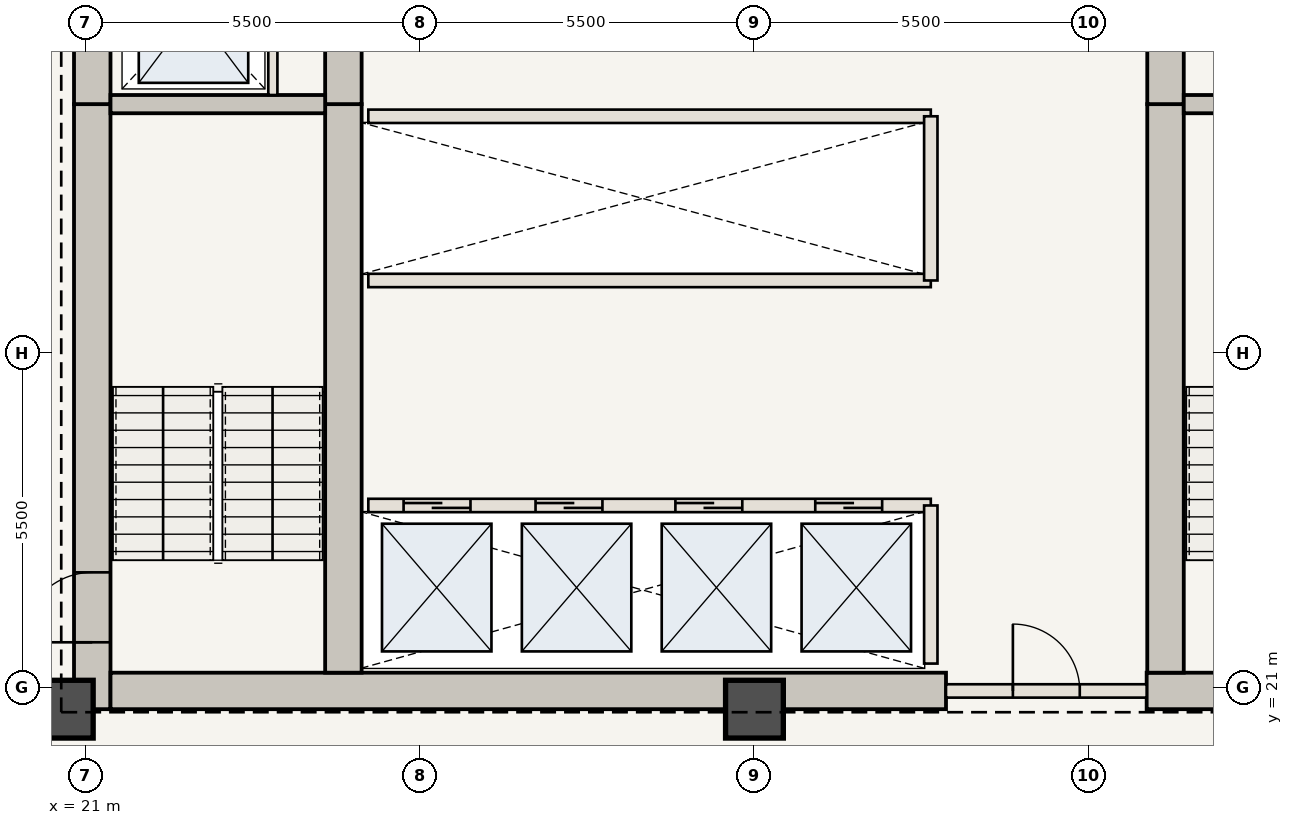
"""IFC4 building model, lengths in metres.
Left out: names, types, materials, properties, quantities, classifications, styles, units other than length and angle.
Written with IfcOpenShell. Run it as: python <this file> out.ifc"""

import sys

from ifc_helpers import new_model, si_unit, direction, frame, frame_2d, origin, origin_2d, place, context, subcontext, project, spatial, rectangle, extrude, element, fill, save


model = new_model("IFC4")
c1 = context("Model", 3, precision=1e-05, world=origin(), true_north=direction((0.0, 1.0)))
c2 = subcontext(c1, "Body", "Model", "MODEL_VIEW")
j1 = project(units=[si_unit("LENGTHUNIT", "METRE"), si_unit("PLANEANGLEUNIT", "RADIAN")], contexts=[c1])
p1 = place(None, origin())
s1 = spatial("IfcSite", under=j1, at=p1, CompositionType="ELEMENT")
p2 = place(p1, origin())
s2 = spatial("IfcBuilding", under=s1, at=p2, CompositionType="ELEMENT")
p3 = place(p2, frame((0.0, 0.0, 118.3)))
s3 = spatial("IfcBuildingStorey", under=s2, at=p3, CompositionType="ELEMENT", Elevation=118.3)
p4 = place(p3, frame((21.11, 20.65, 0.0), z_axis=(0.0, 0.0, 1.0), x_axis=(0.0, 1.0, 0.0)))
e1 = element("IfcWall", 1, at=p4, inside=s3, PredefinedType="SHEAR", context=c2, shape_type="SweptSolid", body=[
    extrude(rectangle(XDim=9.95, YDim=0.6, at=frame_2d((4.975, 0.0))), origin(), (0.0, 0.0, 1.0), 3.85),
])
p5 = place(p4, frame((1.1, 0.0, 0.0)))
e2 = element("IfcOpeningElement", 2, at=p5, cuts=e1, PredefinedType="OPENING", context=c2, shape_type="SweptSolid", body=[
    extrude(rectangle(XDim=1.15, YDim=2.15, at=frame_2d((0.575, 1.075))), frame((0.0, 0.31, 0.0), z_axis=(0.0, -1.0, 0.0), x_axis=(1.0, 0.0, 0.0)), (0.0, 0.0, 1.0), 0.62),
])
p6 = place(p3, frame((21.11, 30.6, 0.0), z_axis=(0.0, 0.0, 1.0), x_axis=(0.0, 1.0, 0.0)))
e3 = element("IfcWall", 3, at=p6, inside=s3, PredefinedType="SHEAR", context=c2, shape_type="SweptSolid", body=[
    extrude(rectangle(XDim=12.7, YDim=0.6, at=frame_2d((6.35, 0.0))), origin(), (0.0, 0.0, 1.0), 3.85),
])
p7 = place(p6, frame((4.2, 0.0, 0.0)))
e4 = element("IfcOpeningElement", 4, at=p7, cuts=e3, PredefinedType="OPENING", context=c2, shape_type="SweptSolid", body=[
    extrude(rectangle(XDim=1.1, YDim=2.15, at=frame_2d((0.55, 1.075))), frame((0.0, 0.31, 0.0), z_axis=(0.0, -1.0, 0.0), x_axis=(1.0, 0.0, 0.0)), (0.0, 0.0, 1.0), 0.62),
])
p8 = place(p6, frame((8.05, 0.0, 0.0)))
e5 = element("IfcOpeningElement", 5, at=p8, cuts=e3, PredefinedType="OPENING", context=c2, shape_type="SweptSolid", body=[
    extrude(rectangle(XDim=0.92, YDim=2.1, at=frame_2d((0.46, 1.05))), frame((0.0, 0.31, 0.0), z_axis=(0.0, -1.0, 0.0), x_axis=(1.0, 0.0, 0.0)), (0.0, 0.0, 1.0), 0.62),
])
p9 = place(p6, frame((9.45, 0.0, 0.0)))
e6 = element("IfcOpeningElement", 6, at=p9, cuts=e3, PredefinedType="OPENING", context=c2, shape_type="SweptSolid", body=[
    extrude(rectangle(XDim=0.88, YDim=2.1, at=frame_2d((0.44, 1.05))), frame((0.0, 0.31, 0.0), z_axis=(0.0, -1.0, 0.0), x_axis=(1.0, 0.0, 0.0)), (0.0, 0.0, 1.0), 0.62),
])
p10 = place(p6, frame((10.85, 0.0, 0.0)))
e7 = element("IfcOpeningElement", 7, at=p10, cuts=e3, PredefinedType="OPENING", context=c2, shape_type="SweptSolid", body=[
    extrude(rectangle(XDim=0.88, YDim=2.1, at=frame_2d((0.44, 1.05))), frame((0.0, 0.31, 0.0), z_axis=(0.0, -1.0, 0.0), x_axis=(1.0, 0.0, 0.0)), (0.0, 0.0, 1.0), 0.62),
])
p11 = place(p3, frame((21.41, 20.95, 0.0), z_axis=(0.0, 0.0, 1.0), x_axis=(1.0, 0.0, 0.0)))
e8 = element("IfcWall", 8, at=p11, inside=s3, PredefinedType="SHEAR", context=c2, shape_type="SweptSolid", body=[
    extrude(rectangle(XDim=13.74, YDim=0.6, at=frame_2d((6.87, 0.0))), origin(), (0.0, 0.0, 1.0), 3.85),
])
p12 = place(p3, frame((38.45, 20.95, 0.0), z_axis=(0.0, 0.0, 1.0), x_axis=(1.0, 0.0, 0.0)))
e9 = element("IfcWall", 9, at=p12, inside=s3, PredefinedType="SHEAR", context=c2, shape_type="SweptSolid", body=[
    extrude(rectangle(XDim=4.14, YDim=0.6, at=frame_2d((2.07, 0.0))), origin(), (0.0, 0.0, 1.0), 3.85),
])
p13 = place(p3, frame((25.24, 21.25, 0.0), z_axis=(0.0, 0.0, 1.0), x_axis=(0.0, 1.0, 0.0)))
e10 = element("IfcWall", 10, at=p13, inside=s3, PredefinedType="SHEAR", context=c2, shape_type="SweptSolid", body=[
    extrude(rectangle(XDim=9.35, YDim=0.6, at=frame_2d((4.675, 0.0))), origin(), (0.0, 0.0, 1.0), 3.85),
])
p14 = place(p3, frame((25.24, 30.6, 0.0), z_axis=(0.0, 0.0, 1.0), x_axis=(0.0, 1.0, 0.0)))
e11 = element("IfcWall", 11, at=p14, inside=s3, PredefinedType="SHEAR", context=c2, shape_type="SweptSolid", body=[
    extrude(rectangle(XDim=12.1, YDim=0.6, at=frame_2d((6.05, 0.0))), origin(), (0.0, 0.0, 1.0), 3.85),
])
p15 = place(p14, frame((6.25, 0.0, 0.0)))
e12 = element("IfcOpeningElement", 12, at=p15, cuts=e11, PredefinedType="OPENING", context=c2, shape_type="SweptSolid", body=[
    extrude(rectangle(XDim=1.1, YDim=2.15, at=frame_2d((0.55, 1.075))), frame((0.0, 0.31, 0.0), z_axis=(0.0, -1.0, 0.0), x_axis=(1.0, 0.0, 0.0)), (0.0, 0.0, 1.0), 0.62),
])
p16 = place(p3, frame((38.76, 21.25, 0.0), z_axis=(0.0, 0.0, 1.0), x_axis=(0.0, 1.0, 0.0)))
e13 = element("IfcWall", 13, at=p16, inside=s3, PredefinedType="SHEAR", context=c2, shape_type="SweptSolid", body=[
    extrude(rectangle(XDim=9.35, YDim=0.6, at=frame_2d((4.675, 0.0))), origin(), (0.0, 0.0, 1.0), 3.85),
])
p17 = place(p3, frame((38.76, 30.6, 0.0), z_axis=(0.0, 0.0, 1.0), x_axis=(0.0, 1.0, 0.0)))
e14 = element("IfcWall", 14, at=p17, inside=s3, PredefinedType="SHEAR", context=c2, shape_type="SweptSolid", body=[
    extrude(rectangle(XDim=12.1, YDim=0.6, at=frame_2d((6.05, 0.0))), origin(), (0.0, 0.0, 1.0), 3.85),
])
for number, where, z_axis, x_axis in (
    (15, (20.65, 20.65, 0.0), (0.0, 0.0, 1.0), (1.0, 0.0, 0.0)),
    (16, (32.0, 20.65, 0.0), (0.0, 0.0, 1.0), (1.0, 0.0, 0.0)),
):
    element("IfcColumn", number, at=place(p3, frame(where, z_axis=z_axis, x_axis=x_axis)), inside=s3, PredefinedType="COLUMN", context=c2, shape_type="SweptSolid", body=[
        extrude(rectangle(XDim=0.95, YDim=0.95, at=origin_2d()), origin(), (0.0, 0.0, 1.0), 3.85),
    ])
for number, where, z_axis, x_axis in (
    (17, (21.41, 30.6, 0.0), (0.0, 0.0, 1.0), (1.0, 0.0, 0.0)),
    (18, (39.06, 30.6, 0.0), (0.0, 0.0, 1.0), (1.0, 0.0, 0.0)),
):
    element("IfcWall", number, at=place(p3, frame(where, z_axis=z_axis, x_axis=x_axis)), inside=s3, PredefinedType="SHEAR", context=c2, shape_type="SweptSolid", body=[
        extrude(rectangle(XDim=3.53, YDim=0.3, at=frame_2d((1.765, 0.0))), origin(), (0.0, 0.0, 1.0), 3.685),
    ])
p18 = place(p3, frame((24.08, 30.75, 0.0), z_axis=(0.0, 0.0, 1.0), x_axis=(0.0, 1.0, 0.0)))
e19 = element("IfcWall", 19, at=p18, inside=s3, PredefinedType="STANDARD", context=c2, shape_type="SweptSolid", body=[
    extrude(rectangle(XDim=2.65, YDim=0.15, at=frame_2d((1.325, 0.0))), origin(), (0.0, 0.0, 1.0), 3.685),
])
p19 = place(p3, frame((35.15, 20.95, 0.0), z_axis=(0.0, 0.0, 1.0), x_axis=(1.0, 0.0, 0.0)))
e20 = element("IfcWall", 20, at=p19, inside=s3, PredefinedType="STANDARD", context=c2, shape_type="SweptSolid", body=[
    extrude(rectangle(XDim=3.3, YDim=0.22, at=frame_2d((1.65, 0.0))), origin(), (0.0, 0.0, 1.0), 3.685),
])
p20 = place(p19, frame((1.1, 0.0, 0.0)))
e21 = element("IfcOpeningElement", 21, at=p20, cuts=e20, PredefinedType="OPENING", context=c2, shape_type="SweptSolid", body=[
    extrude(rectangle(XDim=1.1, YDim=2.15, at=frame_2d((0.55, 1.075))), frame((0.0, 0.12, 0.0), z_axis=(0.0, -1.0, 0.0), x_axis=(1.0, 0.0, 0.0)), (0.0, 0.0, 1.0), 0.24),
])
p21 = place(p3, frame((25.65, 24.0, 0.0), z_axis=(0.0, 0.0, 1.0), x_axis=(1.0, 0.0, 0.0)))
e22 = element("IfcWall", 22, at=p21, inside=s3, PredefinedType="STANDARD", context=c2, shape_type="SweptSolid", body=[
    extrude(rectangle(XDim=9.25, YDim=0.22, at=frame_2d((4.625, 0.0))), origin(), (0.0, 0.0, 1.0), 3.685),
])
p22 = place(p21, frame((0.58, 0.0, 0.0)))
e23 = element("IfcOpeningElement", 23, at=p22, cuts=e22, PredefinedType="OPENING", context=c2, shape_type="SweptSolid", body=[
    extrude(rectangle(XDim=1.1, YDim=2.15, at=frame_2d((0.55, 1.075))), frame((0.0, 0.12, 0.0), z_axis=(0.0, -1.0, 0.0), x_axis=(1.0, 0.0, 0.0)), (0.0, 0.0, 1.0), 0.24),
])
p23 = place(p21, frame((2.75, 0.0, 0.0)))
e24 = element("IfcOpeningElement", 24, at=p23, cuts=e22, PredefinedType="OPENING", context=c2, shape_type="SweptSolid", body=[
    extrude(rectangle(XDim=1.1, YDim=2.15, at=frame_2d((0.55, 1.075))), frame((0.0, 0.12, 0.0), z_axis=(0.0, -1.0, 0.0), x_axis=(1.0, 0.0, 0.0)), (0.0, 0.0, 1.0), 0.24),
])
p24 = place(p21, frame((5.05, 0.0, 0.0)))
e25 = element("IfcOpeningElement", 25, at=p24, cuts=e22, PredefinedType="OPENING", context=c2, shape_type="SweptSolid", body=[
    extrude(rectangle(XDim=1.1, YDim=2.15, at=frame_2d((0.55, 1.075))), frame((0.0, 0.12, 0.0), z_axis=(0.0, -1.0, 0.0), x_axis=(1.0, 0.0, 0.0)), (0.0, 0.0, 1.0), 0.24),
])
p25 = place(p21, frame((7.35, 0.0, 0.0)))
e26 = element("IfcOpeningElement", 26, at=p25, cuts=e22, PredefinedType="OPENING", context=c2, shape_type="SweptSolid", body=[
    extrude(rectangle(XDim=1.1, YDim=2.15, at=frame_2d((0.55, 1.075))), frame((0.0, 0.12, 0.0), z_axis=(0.0, -1.0, 0.0), x_axis=(1.0, 0.0, 0.0)), (0.0, 0.0, 1.0), 0.24),
])
p26 = place(p3, frame((34.9, 21.4, 0.0), z_axis=(0.0, 0.0, 1.0), x_axis=(0.0, 1.0, 0.0)))
e27 = element("IfcWall", 27, at=p26, inside=s3, PredefinedType="STANDARD", context=c2, shape_type="SweptSolid", body=[
    extrude(rectangle(XDim=2.6, YDim=0.22, at=frame_2d((1.3, 0.0))), origin(), (0.0, 0.0, 1.0), 3.685),
])
for number, where, z_axis, x_axis in (
    (28, (25.65, 27.7, 0.0), (0.0, 0.0, 1.0), (1.0, 0.0, 0.0)),
    (29, (25.65, 30.4, 0.0), (0.0, 0.0, 1.0), (1.0, 0.0, 0.0)),
):
    element("IfcWall", number, at=place(p3, frame(where, z_axis=z_axis, x_axis=x_axis)), inside=s3, PredefinedType="STANDARD", context=c2, shape_type="SweptSolid", body=[
        extrude(rectangle(XDim=9.25, YDim=0.22, at=frame_2d((4.625, 0.0))), origin(), (0.0, 0.0, 1.0), 3.685),
    ])
p27 = place(p3, frame((34.9, 27.7, 0.0), z_axis=(0.0, 0.0, 1.0), x_axis=(0.0, 1.0, 0.0)))
e30 = element("IfcWall", 30, at=p27, inside=s3, PredefinedType="STANDARD", context=c2, shape_type="SweptSolid", body=[
    extrude(rectangle(XDim=2.7, YDim=0.22, at=frame_2d((1.35, 0.0))), origin(), (0.0, 0.0, 1.0), 3.685),
])
p28 = place(p5, origin())
e31 = element("IfcDoor", 31, at=p28, inside=s3, OperationType="SINGLE_SWING_LEFT", PredefinedType="DOOR", context=c2, shape_type="SweptSolid", body=[
    extrude(rectangle(XDim=1.15, YDim=2.15, at=frame_2d((0.575, 1.075))), frame((0.0, 0.025, 0.0), z_axis=(0.0, -1.0, 0.0), x_axis=(1.0, 0.0, 0.0)), (0.0, 0.0, 1.0), 0.05),
])
fill(e2, e31)
p29 = place(p20, origin())
e32 = element("IfcDoor", 32, at=p29, inside=s3, OperationType="SINGLE_SWING_LEFT", PredefinedType="DOOR", context=c2, shape_type="SweptSolid", body=[
    extrude(rectangle(XDim=1.1, YDim=2.15, at=frame_2d((0.55, 1.075))), frame((0.0, 0.025, 0.0), z_axis=(0.0, -1.0, 0.0), x_axis=(1.0, 0.0, 0.0)), (0.0, 0.0, 1.0), 0.05),
])
fill(e21, e32)
p30 = place(p22, origin())
e33 = element("IfcDoor", 33, at=p30, inside=s3, OperationType="DOUBLE_DOOR_SLIDING", PredefinedType="DOOR", context=c2, shape_type="SweptSolid", body=[
    extrude(rectangle(XDim=1.1, YDim=2.15, at=frame_2d((0.55, 1.075))), frame((0.0, 0.025, 0.0), z_axis=(0.0, -1.0, 0.0), x_axis=(1.0, 0.0, 0.0)), (0.0, 0.0, 1.0), 0.05),
])
fill(e23, e33)
p31 = place(p23, origin())
e34 = element("IfcDoor", 34, at=p31, inside=s3, OperationType="DOUBLE_DOOR_SLIDING", PredefinedType="DOOR", context=c2, shape_type="SweptSolid", body=[
    extrude(rectangle(XDim=1.1, YDim=2.15, at=frame_2d((0.55, 1.075))), frame((0.0, 0.025, 0.0), z_axis=(0.0, -1.0, 0.0), x_axis=(1.0, 0.0, 0.0)), (0.0, 0.0, 1.0), 0.05),
])
fill(e24, e34)
p32 = place(p24, origin())
e35 = element("IfcDoor", 35, at=p32, inside=s3, OperationType="DOUBLE_DOOR_SLIDING", PredefinedType="DOOR", context=c2, shape_type="SweptSolid", body=[
    extrude(rectangle(XDim=1.1, YDim=2.15, at=frame_2d((0.55, 1.075))), frame((0.0, 0.025, 0.0), z_axis=(0.0, -1.0, 0.0), x_axis=(1.0, 0.0, 0.0)), (0.0, 0.0, 1.0), 0.05),
])
fill(e25, e35)
p33 = place(p25, origin())
e36 = element("IfcDoor", 36, at=p33, inside=s3, OperationType="DOUBLE_DOOR_SLIDING", PredefinedType="DOOR", context=c2, shape_type="SweptSolid", body=[
    extrude(rectangle(XDim=1.1, YDim=2.15, at=frame_2d((0.55, 1.075))), frame((0.0, 0.025, 0.0), z_axis=(0.0, -1.0, 0.0), x_axis=(1.0, 0.0, 0.0)), (0.0, 0.0, 1.0), 0.05),
])
fill(e26, e36)
save(model, sys.argv[1])
